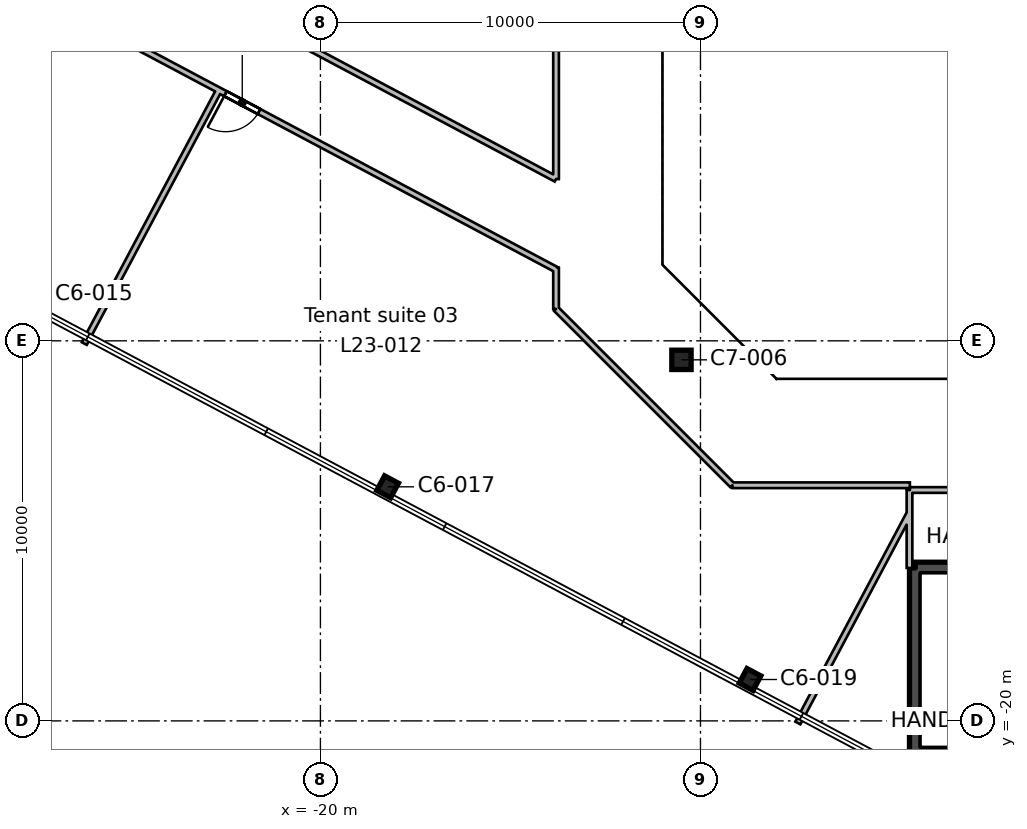
"""IFC4 building model, lengths in metres.
Left out: names, types, materials, properties, quantities, classifications, styles, units other than length and angle.
Written with IfcOpenShell. Run it as: python <this file> out.ifc"""

import sys

from ifc_helpers import new_model, si_unit, direction, frame, frame_2d, origin, origin_2d, place, context, subcontext, project, spatial, rectangle, hollow_rectangle, i_section, extrude, element, fill, save


model = new_model("IFC4")
c1 = context("Model", 3, precision=1e-05, world=origin(), true_north=direction((0.0, 1.0)))
c2 = subcontext(c1, "Body", "Model", "MODEL_VIEW")
j1 = project(units=[si_unit("LENGTHUNIT", "METRE"), si_unit("PLANEANGLEUNIT", "RADIAN")], contexts=[c1])
p1 = place(None, origin())
s1 = spatial("IfcSite", under=j1, at=p1, CompositionType="ELEMENT")
p2 = place(p1, origin())
s2 = spatial("IfcBuilding", under=s1, at=p2, CompositionType="ELEMENT")
p3 = place(p2, frame((0.0, 0.0, 118.2)))
s3 = spatial("IfcBuildingStorey", under=s2, at=p3, CompositionType="ELEMENT", Elevation=118.2)
for number, where, z_axis, x_axis in (
    (1, (-8.696, -18.911, 0.0), (0.0, 0.0, 1.0), (0.883, -0.469, 0.0)),
    (2, (-18.232, -13.841, 0.0), (0.0, 0.0, 1.0), (0.883, -0.469, 0.0)),
):
    element("IfcColumn", number, at=place(p3, frame(where, z_axis=z_axis, x_axis=x_axis)), inside=s3, PredefinedType="COLUMN", context=c2, shape_type="SweptSolid", body=[
        extrude(i_section(OverallWidth=0.412, OverallDepth=0.434, WebThickness=0.036, FlangeThickness=0.057, FilletRadius=0.015, at=origin_2d()), origin(), (0.0, 0.0, 1.0), 4.0),
    ])
p4 = place(p3, frame((-10.5, -10.5, 0.0), z_axis=(0.0, 0.0, 1.0), x_axis=(1.0, 0.0, 0.0)))
e3 = element("IfcColumn", 3, at=p4, inside=s3, PredefinedType="COLUMN", context=c2, shape_type="SweptSolid", body=[
    extrude(hollow_rectangle(XDim=0.508, YDim=0.508, WallThickness=0.012, InnerFilletRadius=0.006, OuterFilletRadius=0.018, at=origin_2d()), origin(), (0.0, 0.0, 1.0), 4.0),
])
p5 = place(p3, frame((3.95, -20.825, 0.0), z_axis=(0.0, 0.0, 1.0), x_axis=(-1.0, 0.0, 0.0)))
e4 = element("IfcWall", 4, at=p5, inside=s3, PredefinedType="SHEAR", context=c2, shape_type="SweptSolid", body=[
    extrude(rectangle(XDim=8.3, YDim=0.3, at=frame_2d((4.15, 0.0))), origin(), (0.0, 0.0, 1.0), 4.0),
])
p6 = place(p3, frame((-4.35, -20.825, 0.0), z_axis=(0.0, 0.0, 1.0), x_axis=(0.0, 1.0, 0.0)))
e5 = element("IfcWall", 5, at=p6, inside=s3, PredefinedType="SHEAR", context=c2, shape_type="SweptSolid", body=[
    extrude(rectangle(XDim=4.85, YDim=0.3, at=frame_2d((2.425, 0.0))), origin(), (0.0, 0.0, 1.0), 4.0),
])
p7 = place(p3, frame((-4.35, -15.975, 0.0), z_axis=(0.0, 0.0, 1.0), x_axis=(1.0, 0.0, 0.0)))
e6 = element("IfcWall", 6, at=p7, inside=s3, PredefinedType="SHEAR", context=c2, shape_type="SweptSolid", body=[
    extrude(rectangle(XDim=8.3, YDim=0.3, at=frame_2d((4.15, 0.0))), origin(), (0.0, 0.0, 1.0), 4.0),
])
p8 = place(p7, frame((6.05, 0.0, 0.0)))
e7 = element("IfcOpeningElement", 7, at=p8, cuts=e6, PredefinedType="OPENING", context=c2, shape_type="SweptSolid", body=[
    extrude(rectangle(XDim=1.9, YDim=2.1, at=frame_2d((0.95, 1.05))), frame((0.0, 0.16, 0.0), z_axis=(0.0, -1.0, 0.0), x_axis=(1.0, 0.0, 0.0)), (0.0, 0.0, 1.0), 0.32),
])
p9 = place(p3, frame((-13.8, -8.122, 0.0), z_axis=(0.0, 0.0, 1.0), x_axis=(-0.882950271686, 0.469466524611, 0.0)))
e8 = element("IfcWall", 8, at=p9, inside=s3, PredefinedType="PARTITIONING", context=c2, shape_type="SweptSolid", body=[
    extrude(rectangle(XDim=34.727, YDim=0.15, at=frame_2d((17.363, 0.0))), origin(), (0.0, 0.0, 1.0), 3.64),
])
p10 = place(p9, frame((26.15, 0.0, 0.0)))
e9 = element("IfcOpeningElement", 9, at=p10, cuts=e8, PredefinedType="OPENING", context=c2, shape_type="SweptSolid", body=[
    extrude(rectangle(XDim=1.0, YDim=2.1, at=frame_2d((0.5, 1.05))), frame((0.0, 0.085, 0.0), z_axis=(0.0, -1.0, 0.0), x_axis=(1.0, 0.0, 0.0)), (0.0, 0.0, 1.0), 0.17),
])
p11 = place(p9, frame((16.85, 0.0, 0.0)))
e10 = element("IfcOpeningElement", 10, at=p11, cuts=e8, PredefinedType="OPENING", context=c2, shape_type="SweptSolid", body=[
    extrude(rectangle(XDim=1.0, YDim=2.1, at=frame_2d((0.5, 1.05))), frame((0.0, 0.085, 0.0), z_axis=(0.0, -1.0, 0.0), x_axis=(1.0, 0.0, 0.0)), (0.0, 0.0, 1.0), 0.17),
])
p12 = place(p9, frame((8.851, 0.0, 0.0)))
e11 = element("IfcOpeningElement", 11, at=p12, cuts=e8, PredefinedType="OPENING", context=c2, shape_type="SweptSolid", body=[
    extrude(rectangle(XDim=1.0, YDim=2.1, at=frame_2d((0.5, 1.05))), frame((0.0, 0.085, 0.0), z_axis=(0.0, -1.0, 0.0), x_axis=(1.0, 0.0, 0.0)), (0.0, 0.0, 1.0), 0.17),
])
p13 = place(p3, frame((-22.67, -3.406, 0.0), z_axis=(0.0, 0.0, 1.0), x_axis=(-0.469451537303, -0.882958240306, 0.0)))
e12 = element("IfcWall", 12, at=p13, inside=s3, PredefinedType="PARTITIONING", context=c2, shape_type="SweptSolid", body=[
    extrude(rectangle(XDim=7.55, YDim=0.15, at=frame_2d((3.775, 0.0))), origin(), (0.0, 0.0, 1.0), 3.64),
])
p14 = place(p3, frame((-4.49, -13.8, 0.0), z_axis=(0.0, 0.0, 1.0), x_axis=(-1.0, 0.0, 0.0)))
e13 = element("IfcWall", 13, at=p14, inside=s3, PredefinedType="PARTITIONING", context=c2, shape_type="SweptSolid", body=[
    extrude(rectangle(XDim=4.67, YDim=0.15, at=frame_2d((2.335, 0.0))), origin(), (0.0, 0.0, 1.0), 3.64),
])
p15 = place(p3, frame((-9.16, -13.8, 0.0), z_axis=(0.0, 0.0, 1.0), x_axis=(-0.707106781187, 0.707106781187, 0.0)))
e14 = element("IfcWall", 14, at=p15, inside=s3, PredefinedType="PARTITIONING", context=c2, shape_type="SweptSolid", body=[
    extrude(rectangle(XDim=6.562, YDim=0.15, at=frame_2d((3.281, 0.0))), origin(), (0.0, 0.0, 1.0), 3.64),
])
p16 = place(p3, frame((-13.8, -9.16, 0.0), z_axis=(0.0, 0.0, 1.0), x_axis=(0.0, 1.0, 0.0)))
e15 = element("IfcWall", 15, at=p16, inside=s3, PredefinedType="PARTITIONING", context=c2, shape_type="SweptSolid", body=[
    extrude(rectangle(XDim=1.088, YDim=0.15, at=frame_2d((0.544, 0.0))), origin(), (0.0, 0.0, 1.0), 3.64),
])
p17 = place(p3, frame((-4.5, -14.533, 0.0), z_axis=(0.0, 0.0, 1.0), x_axis=(-0.469522352041, -0.882920585859, 0.0)))
e16 = element("IfcWall", 16, at=p17, inside=s3, PredefinedType="PARTITIONING", context=c2, shape_type="SweptSolid", body=[
    extrude(rectangle(XDim=6.255, YDim=0.15, at=frame_2d((3.128, 0.0))), origin(), (0.0, 0.0, 1.0), 3.64),
])
p18 = place(p3, frame((-4.5, -13.926, 0.0), z_axis=(0.0, 0.0, 1.0), x_axis=(0.0, -1.0, 0.0)))
e17 = element("IfcWall", 17, at=p18, inside=s3, PredefinedType="PARTITIONING", context=c2, shape_type="SweptSolid", body=[
    extrude(rectangle(XDim=2.049, YDim=0.15, at=frame_2d((1.024, 0.0))), origin(), (0.0, 0.0, 1.0), 3.64),
])
p19 = place(p3, frame((-4.49, -13.925, 0.0), z_axis=(0.0, 0.0, 1.0), x_axis=(1.0, 0.0, 0.0)))
e18 = element("IfcWall", 18, at=p19, inside=s3, PredefinedType="PARTITIONING", context=c2, shape_type="SweptSolid", body=[
    extrude(rectangle(XDim=1.604, YDim=0.15, at=frame_2d((0.802, 0.0))), origin(), (0.0, 0.0, 1.0), 3.64),
])
p20 = place(p3, frame((-13.8, 9.16, 0.0), z_axis=(0.0, 0.0, 1.0), x_axis=(0.0, -1.0, 0.0)))
e19 = element("IfcWall", 19, at=p20, inside=s3, PredefinedType="PARTITIONING", context=c2, shape_type="SweptSolid", body=[
    extrude(rectangle(XDim=14.904, YDim=0.15, at=frame_2d((7.452, 0.0))), origin(), (0.0, 0.0, 1.0), 3.64),
])
p21 = place(p3, frame((-13.8, -5.744, 0.0), z_axis=(0.0, 0.0, 1.0), x_axis=(-0.882913323819, 0.469536007803, 0.0)))
e20 = element("IfcWall", 20, at=p21, inside=s3, PredefinedType="PARTITIONING", context=c2, shape_type="SweptSolid", body=[
    extrude(rectangle(XDim=8.312, YDim=0.15, at=frame_2d((4.156, 0.0))), origin(), (0.0, 0.0, 1.0), 3.64),
])
p22 = place(p12, origin())
e21 = element("IfcDoor", 21, at=p22, inside=s3, OperationType="SINGLE_SWING_RIGHT", PredefinedType="DOOR", context=c2, shape_type="SweptSolid", body=[
    extrude(rectangle(XDim=1.0, YDim=2.1, at=frame_2d((0.5, 1.05))), frame((0.0, 0.025, 0.0), z_axis=(0.0, -1.0, 0.0), x_axis=(1.0, 0.0, 0.0)), (0.0, 0.0, 1.0), 0.05),
])
fill(e11, e21)
save(model, sys.argv[1])
